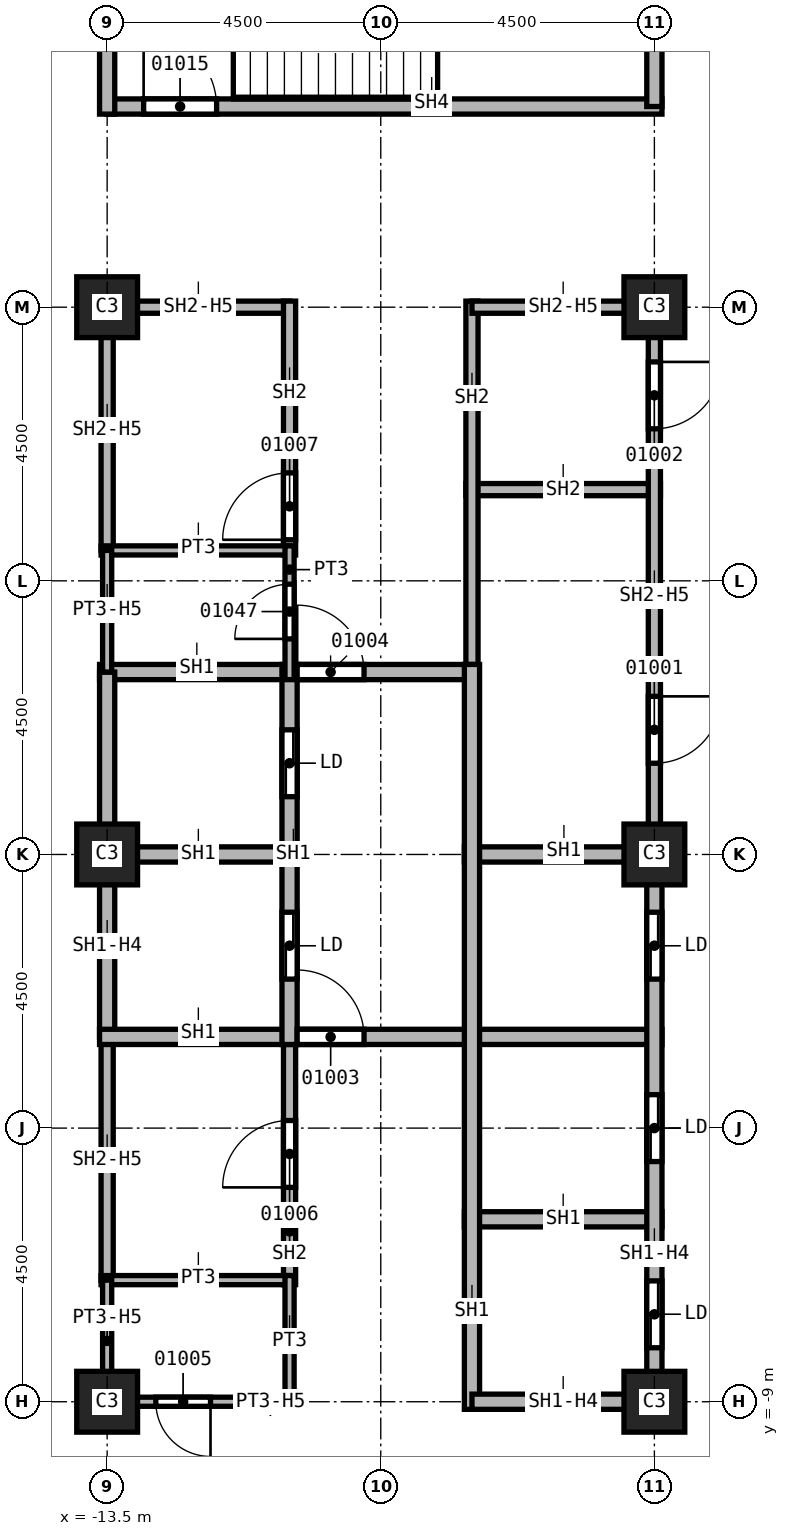
"""IFC4 building model, lengths in metres.
Left out: names, types, materials, properties, quantities, classifications, styles, units other than length and angle.
Written with IfcOpenShell. Run it as: python <this file> out.ifc"""

import sys

from ifc_helpers import new_model, si_unit, direction, frame, frame_2d, origin, origin_2d, place, context, subcontext, project, spatial, rectangle, extrude, element, fill, save


model = new_model("IFC4")
c1 = context("Model", 3, precision=1e-05, world=origin(), true_north=direction((0.0, 1.0)))
c2 = subcontext(c1, "Body", "Model", "MODEL_VIEW")
j1 = project(units=[si_unit("LENGTHUNIT", "METRE"), si_unit("PLANEANGLEUNIT", "RADIAN")], contexts=[c1])
p1 = place(None, origin())
s1 = spatial("IfcSite", under=j1, at=p1, CompositionType="ELEMENT")
p2 = place(p1, origin())
s2 = spatial("IfcBuilding", under=s1, at=p2, CompositionType="ELEMENT")
p3 = place(p2, frame((0.0, 0.0, 68.0)))
s3 = spatial("IfcBuildingStorey", under=s2, at=p3, CompositionType="ELEMENT", Elevation=68.0)
for number, where, z_axis, x_axis in (
    (1, (-4.5, 0.0, 0.0), (0.0, 0.0, 1.0), (1.0, 0.0, 0.0)),
    (2, (-4.5, 9.0, 0.0), (0.0, 0.0, 1.0), (1.0, 0.0, 0.0)),
    (3, (-4.5, -9.0, 0.0), (0.0, 0.0, 1.0), (1.0, 0.0, 0.0)),
    (4, (-13.5, 0.0, 0.0), (0.0, 0.0, 1.0), (1.0, 0.0, 0.0)),
    (5, (-13.5, 9.0, 0.0), (0.0, 0.0, 1.0), (1.0, 0.0, 0.0)),
    (6, (-13.5, -9.0, 0.0), (0.0, 0.0, 1.0), (1.0, 0.0, 0.0)),
):
    element("IfcColumn", number, at=place(p3, frame(where, z_axis=z_axis, x_axis=x_axis)), inside=s3, PredefinedType="COLUMN", context=c2, shape_type="SweptSolid", body=[
        extrude(rectangle(XDim=1.0, YDim=1.0, at=origin_2d()), origin(), (0.0, 0.0, 1.0), 3.7),
    ])
p4 = place(p3, frame((-13.5, -7.0, 0.0), z_axis=(0.0, 0.0, 1.0), x_axis=(0.0, 1.0, 0.0)))
e7 = element("IfcWall", 7, at=p4, inside=s3, PredefinedType="SOLIDWALL", context=c2, shape_type="SweptSolid", body=[
    extrude(rectangle(XDim=4.0, YDim=0.2, at=frame_2d((2.0, 0.0))), origin(), (0.0, 0.0, 1.0), 2.938),
])
p5 = place(p3, frame((-13.5, 5.0, 0.0), z_axis=(0.0, 0.0, 1.0), x_axis=(0.0, 1.0, 0.0)))
e8 = element("IfcWall", 8, at=p5, inside=s3, PredefinedType="SOLIDWALL", context=c2, shape_type="SweptSolid", body=[
    extrude(rectangle(XDim=4.1, YDim=0.2, at=frame_2d((2.05, 0.0))), origin(), (0.0, 0.0, 1.0), 2.938),
])
p6 = place(p3, frame((-13.5, 9.0, 0.0), z_axis=(0.0, 0.0, 1.0), x_axis=(1.0, 0.0, 0.0)))
e9 = element("IfcWall", 9, at=p6, inside=s3, PredefinedType="SOLIDWALL", context=c2, shape_type="SweptSolid", body=[
    extrude(rectangle(XDim=3.0, YDim=0.2, at=frame_2d((1.5, 0.0))), origin(), (0.0, 0.0, 1.0), 2.938),
])
p7 = place(p3, frame((-10.5, -7.075, 0.0), z_axis=(0.0, 0.0, 1.0), x_axis=(0.0, 1.0, 0.0)))
e10 = element("IfcWall", 10, at=p7, inside=s3, PredefinedType="SOLIDWALL", context=c2, shape_type="SweptSolid", body=[
    extrude(rectangle(XDim=4.2, YDim=0.2, at=frame_2d((2.1, 0.0))), origin(), (0.0, 0.0, 1.0), 3.7),
])
p8 = place(p7, frame((1.6, 0.0, 0.0)))
e11 = element("IfcOpeningElement", 11, at=p8, cuts=e10, PredefinedType="OPENING", context=c2, shape_type="SweptSolid", body=[
    extrude(rectangle(XDim=1.1, YDim=2.1, at=frame_2d((0.55, 1.05))), frame((0.0, 0.1, 0.0), z_axis=(0.0, -1.0, 0.0), x_axis=(1.0, 0.0, 0.0)), (0.0, 0.0, 1.0), 0.2),
])
p9 = place(p3, frame((-10.5, 4.925, 0.0), z_axis=(0.0, 0.0, 1.0), x_axis=(0.0, 1.0, 0.0)))
e12 = element("IfcWall", 12, at=p9, inside=s3, PredefinedType="SOLIDWALL", context=c2, shape_type="SweptSolid", body=[
    extrude(rectangle(XDim=4.175, YDim=0.2, at=frame_2d((2.087, 0.0))), origin(), (0.0, 0.0, 1.0), 3.7),
])
p10 = place(p9, frame((0.25, 0.0, 0.0)))
e13 = element("IfcOpeningElement", 13, at=p10, cuts=e12, PredefinedType="OPENING", context=c2, shape_type="SweptSolid", body=[
    extrude(rectangle(XDim=1.1, YDim=2.1, at=frame_2d((0.55, 1.05))), frame((0.0, 0.1, 0.0), z_axis=(0.0, -1.0, 0.0), x_axis=(1.0, 0.0, 0.0)), (0.0, 0.0, 1.0), 0.2),
])
p11 = place(p3, frame((-7.6, 6.0, 0.0), z_axis=(0.0, 0.0, 1.0), x_axis=(1.0, 0.0, 0.0)))
e14 = element("IfcWall", 14, at=p11, inside=s3, PredefinedType="SOLIDWALL", context=c2, shape_type="SweptSolid", body=[
    extrude(rectangle(XDim=3.2, YDim=0.2, at=frame_2d((1.6, 0.0))), origin(), (0.0, 0.0, 1.0), 3.7),
])
p12 = place(p3, frame((-7.5, 2.875, 0.0), z_axis=(0.0, 0.0, 1.0), x_axis=(0.0, 1.0, 0.0)))
e15 = element("IfcWall", 15, at=p12, inside=s3, PredefinedType="SOLIDWALL", context=c2, shape_type="SweptSolid", body=[
    extrude(rectangle(XDim=6.225, YDim=0.2, at=frame_2d((3.113, 0.0))), origin(), (0.0, 0.0, 1.0), 3.7),
])
p13 = place(p3, frame((-7.5, 9.0, 0.0), z_axis=(0.0, 0.0, 1.0), x_axis=(1.0, 0.0, 0.0)))
e16 = element("IfcWall", 16, at=p13, inside=s3, PredefinedType="SOLIDWALL", context=c2, shape_type="SweptSolid", body=[
    extrude(rectangle(XDim=3.0, YDim=0.2, at=frame_2d((1.5, 0.0))), origin(), (0.0, 0.0, 1.0), 2.938),
])
p14 = place(p3, frame((-4.5, 9.1, 0.0), z_axis=(0.0, 0.0, 1.0), x_axis=(0.0, -1.0, 0.0)))
e17 = element("IfcWall", 17, at=p14, inside=s3, PredefinedType="SOLIDWALL", context=c2, shape_type="SweptSolid", body=[
    extrude(rectangle(XDim=9.1, YDim=0.2, at=frame_2d((4.55, 0.0))), origin(), (0.0, 0.0, 1.0), 2.938),
])
p15 = place(p14, frame((6.5, 0.0, 0.0)))
e18 = element("IfcOpeningElement", 18, at=p15, cuts=e17, PredefinedType="OPENING", context=c2, shape_type="SweptSolid", body=[
    extrude(rectangle(XDim=1.1, YDim=2.1, at=frame_2d((0.55, 1.05))), frame((0.0, 0.1, 0.0), z_axis=(0.0, -1.0, 0.0), x_axis=(1.0, 0.0, 0.0)), (0.0, 0.0, 1.0), 0.2),
])
p16 = place(p14, frame((1.0, 0.0, 0.0)))
e19 = element("IfcOpeningElement", 19, at=p16, cuts=e17, PredefinedType="OPENING", context=c2, shape_type="SweptSolid", body=[
    extrude(rectangle(XDim=1.1, YDim=2.1, at=frame_2d((0.55, 1.05))), frame((0.0, 0.1, 0.0), z_axis=(0.0, -1.0, 0.0), x_axis=(1.0, 0.0, 0.0)), (0.0, 0.0, 1.0), 0.2),
])
p17 = place(p3, frame((-13.625, 0.0, 0.0), z_axis=(0.0, 0.0, 1.0), x_axis=(1.0, 0.0, 0.0)))
e20 = element("IfcWall", 20, at=p17, inside=s3, PredefinedType="SOLIDWALL", context=c2, shape_type="SweptSolid", body=[
    extrude(rectangle(XDim=3.125, YDim=0.25, at=frame_2d((1.562, 0.0))), origin(), (0.0, 0.0, 1.0), 3.7),
])
p18 = place(p3, frame((-13.625, 3.0, 0.0), z_axis=(0.0, 0.0, 1.0), x_axis=(1.0, 0.0, 0.0)))
e21 = element("IfcWall", 21, at=p18, inside=s3, PredefinedType="SOLIDWALL", context=c2, shape_type="SweptSolid", body=[
    extrude(rectangle(XDim=6.125, YDim=0.25, at=frame_2d((3.062, 0.0))), origin(), (0.0, 0.0, 1.0), 3.7),
])
p19 = place(p18, frame((3.25, 0.0, 0.0)))
e22 = element("IfcOpeningElement", 22, at=p19, cuts=e21, PredefinedType="OPENING", context=c2, shape_type="SweptSolid", body=[
    extrude(rectangle(XDim=1.1, YDim=2.1, at=frame_2d((0.55, 1.05))), frame((0.0, 0.125, 0.0), z_axis=(0.0, -1.0, 0.0), x_axis=(1.0, 0.0, 0.0)), (0.0, 0.0, 1.0), 0.25),
])
p20 = place(p3, frame((-13.5, -3.0, 0.0), z_axis=(0.0, 0.0, 1.0), x_axis=(0.0, 1.0, 0.0)))
e23 = element("IfcWall", 23, at=p20, inside=s3, PredefinedType="SOLIDWALL", context=c2, shape_type="SweptSolid", body=[
    extrude(rectangle(XDim=6.0, YDim=0.25, at=frame_2d((3.0, 0.0))), origin(), (0.0, 0.0, 1.0), 2.938),
])
p21 = place(p3, frame((-13.625, -3.0, 0.0), z_axis=(0.0, 0.0, 1.0), x_axis=(1.0, 0.0, 0.0)))
e24 = element("IfcWall", 24, at=p21, inside=s3, PredefinedType="SOLIDWALL", context=c2, shape_type="SweptSolid", body=[
    extrude(rectangle(XDim=9.25, YDim=0.25, at=frame_2d((4.625, 0.0))), origin(), (0.0, 0.0, 1.0), 3.7),
])
p22 = place(p21, frame((3.25, 0.0, 0.0)))
e25 = element("IfcOpeningElement", 25, at=p22, cuts=e24, PredefinedType="OPENING", context=c2, shape_type="SweptSolid", body=[
    extrude(rectangle(XDim=1.1, YDim=2.1, at=frame_2d((0.55, 1.05))), frame((0.0, 0.125, 0.0), z_axis=(0.0, -1.0, 0.0), x_axis=(1.0, 0.0, 0.0)), (0.0, 0.0, 1.0), 0.25),
])
p23 = place(p3, frame((-10.5, -3.125, 0.0), z_axis=(0.0, 0.0, 1.0), x_axis=(0.0, 1.0, 0.0)))
e26 = element("IfcWall", 26, at=p23, inside=s3, PredefinedType="SOLIDWALL", context=c2, shape_type="SweptSolid", body=[
    extrude(rectangle(XDim=6.25, YDim=0.25, at=frame_2d((3.125, 0.0))), origin(), (0.0, 0.0, 1.0), 3.7),
])
p24 = place(p23, frame((1.075, 0.0, 0.0)))
e27 = element("IfcOpeningElement", 27, at=p24, cuts=e26, PredefinedType="OPENING", context=c2, shape_type="SweptSolid", body=[
    extrude(rectangle(XDim=1.1, YDim=2.1, at=frame_2d((0.55, 1.05))), frame((0.0, 0.125, 0.0), z_axis=(0.0, -1.0, 0.0), x_axis=(1.0, 0.0, 0.0)), (0.0, 0.0, 1.0), 0.25),
])
p25 = place(p23, frame((4.075, 0.0, 0.0)))
e28 = element("IfcOpeningElement", 28, at=p25, cuts=e26, PredefinedType="OPENING", context=c2, shape_type="SweptSolid", body=[
    extrude(rectangle(XDim=1.1, YDim=2.1, at=frame_2d((0.55, 1.05))), frame((0.0, 0.125, 0.0), z_axis=(0.0, -1.0, 0.0), x_axis=(1.0, 0.0, 0.0)), (0.0, 0.0, 1.0), 0.25),
])
for number, where, z_axis, x_axis in (
    (29, (-7.625, -6.0, 0.0), (0.0, 0.0, 1.0), (1.0, 0.0, 0.0)),
    (30, (-7.625, 0.0, 0.0), (0.0, 0.0, 1.0), (1.0, 0.0, 0.0)),
):
    element("IfcWall", number, at=place(p3, frame(where, z_axis=z_axis, x_axis=x_axis)), inside=s3, PredefinedType="SOLIDWALL", context=c2, shape_type="SweptSolid", body=[
        extrude(rectangle(XDim=3.25, YDim=0.25, at=frame_2d((1.625, 0.0))), origin(), (0.0, 0.0, 1.0), 3.7),
    ])
p26 = place(p3, frame((-7.5, -9.125, 0.0), z_axis=(0.0, 0.0, 1.0), x_axis=(0.0, 1.0, 0.0)))
e31 = element("IfcWall", 31, at=p26, inside=s3, PredefinedType="SOLIDWALL", context=c2, shape_type="SweptSolid", body=[
    extrude(rectangle(XDim=12.25, YDim=0.25, at=frame_2d((6.125, 0.0))), origin(), (0.0, 0.0, 1.0), 3.7),
])
p27 = place(p3, frame((-4.5, -9.0, 0.0), z_axis=(0.0, 0.0, 1.0), x_axis=(-1.0, 0.0, 0.0)))
e32 = element("IfcWall", 32, at=p27, inside=s3, PredefinedType="SOLIDWALL", context=c2, shape_type="SweptSolid", body=[
    extrude(rectangle(XDim=3.0, YDim=0.25, at=frame_2d((1.5, 0.0))), origin(), (0.0, 0.0, 1.0), 2.938),
])
p28 = place(p3, frame((-4.5, 0.0, 0.0), z_axis=(0.0, 0.0, 1.0), x_axis=(0.0, -1.0, 0.0)))
e33 = element("IfcWall", 33, at=p28, inside=s3, PredefinedType="SOLIDWALL", context=c2, shape_type="SweptSolid", body=[
    extrude(rectangle(XDim=9.125, YDim=0.25, at=frame_2d((4.562, 0.0))), origin(), (0.0, 0.0, 1.0), 2.938),
])
p29 = place(p28, frame((7.012, 0.0, 0.0)))
e34 = element("IfcOpeningElement", 34, at=p29, cuts=e33, PredefinedType="OPENING", context=c2, shape_type="SweptSolid", body=[
    extrude(rectangle(XDim=1.1, YDim=2.1, at=frame_2d((0.55, 1.05))), frame((0.0, 0.125, 0.0), z_axis=(0.0, -1.0, 0.0), x_axis=(1.0, 0.0, 0.0)), (0.0, 0.0, 1.0), 0.25),
])
p30 = place(p28, frame((3.95, 0.0, 0.0)))
e35 = element("IfcOpeningElement", 35, at=p30, cuts=e33, PredefinedType="OPENING", context=c2, shape_type="SweptSolid", body=[
    extrude(rectangle(XDim=1.1, YDim=2.1, at=frame_2d((0.55, 1.05))), frame((0.0, 0.125, 0.0), z_axis=(0.0, -1.0, 0.0), x_axis=(1.0, 0.0, 0.0)), (0.0, 0.0, 1.0), 0.25),
])
p31 = place(p28, frame((0.95, 0.0, 0.0)))
e36 = element("IfcOpeningElement", 36, at=p31, cuts=e33, PredefinedType="OPENING", context=c2, shape_type="SweptSolid", body=[
    extrude(rectangle(XDim=1.1, YDim=2.1, at=frame_2d((0.55, 1.05))), frame((0.0, 0.125, 0.0), z_axis=(0.0, -1.0, 0.0), x_axis=(1.0, 0.0, 0.0)), (0.0, 0.0, 1.0), 0.25),
])
p32 = place(p3, frame((-13.5, 12.3, 0.0), z_axis=(0.0, 0.0, 1.0), x_axis=(1.0, 0.0, 0.0)))
e37 = element("IfcWall", 37, at=p32, inside=s3, PredefinedType="SOLIDWALL", context=c2, shape_type="SweptSolid", body=[
    extrude(rectangle(XDim=9.125, YDim=0.25, at=frame_2d((4.562, 0.0))), origin(), (0.0, 0.0, 1.0), 3.7),
])
p33 = place(p32, frame((0.6, 0.0, 0.0)))
e38 = element("IfcOpeningElement", 38, at=p33, cuts=e37, PredefinedType="OPENING", context=c2, shape_type="SweptSolid", body=[
    extrude(rectangle(XDim=1.2, YDim=2.1, at=frame_2d((0.6, 1.05))), frame((0.0, 0.125, 0.0), z_axis=(0.0, -1.0, 0.0), x_axis=(1.0, 0.0, 0.0)), (0.0, 0.0, 1.0), 0.25),
])
p34 = place(p3, frame((-13.5, 12.175, 0.0), z_axis=(0.0, 0.0, 1.0), x_axis=(0.0, 1.0, 0.0)))
e39 = element("IfcWall", 39, at=p34, inside=s3, PredefinedType="SOLIDWALL", context=c2, shape_type="SweptSolid", body=[
    extrude(rectangle(XDim=4.75, YDim=0.25, at=frame_2d((2.375, 0.0))), origin(), (0.0, 0.0, 1.0), 3.7),
])
p35 = place(p3, frame((-4.5, 16.8, 0.0), z_axis=(0.0, 0.0, 1.0), x_axis=(0.0, -1.0, 0.0)))
e40 = element("IfcWall", 40, at=p35, inside=s3, PredefinedType="SOLIDWALL", context=c2, shape_type="SweptSolid", body=[
    extrude(rectangle(XDim=4.5, YDim=0.25, at=frame_2d((2.25, 0.0))), origin(), (0.0, 0.0, 1.0), 3.7),
])
for number, where, z_axis, x_axis in (
    (41, (-13.6, -7.0, 0.0), (0.0, 0.0, 1.0), (1.0, 0.0, 0.0)),
    (42, (-13.6, 5.0, 0.0), (0.0, 0.0, 1.0), (1.0, 0.0, 0.0)),
):
    element("IfcWall", number, at=place(p3, frame(where, z_axis=z_axis, x_axis=x_axis)), inside=s3, PredefinedType="PARTITIONING", context=c2, shape_type="SweptSolid", body=[
        extrude(rectangle(XDim=3.1, YDim=0.15, at=frame_2d((1.55, 0.0))), origin(), (0.0, 0.0, 1.0), 3.7),
    ])
p36 = place(p3, frame((-13.5, -9.075, 0.0), z_axis=(0.0, 0.0, 1.0), x_axis=(0.0, 1.0, 0.0)))
e43 = element("IfcWall", 43, at=p36, inside=s3, PredefinedType="PARTITIONING", context=c2, shape_type="SweptSolid", body=[
    extrude(rectangle(XDim=2.075, YDim=0.15, at=frame_2d((1.038, 0.0))), origin(), (0.0, 0.0, 1.0), 2.938),
])
p37 = place(p3, frame((-13.5, 3.0, 0.0), z_axis=(0.0, 0.0, 1.0), x_axis=(0.0, 1.0, 0.0)))
e44 = element("IfcWall", 44, at=p37, inside=s3, PredefinedType="PARTITIONING", context=c2, shape_type="SweptSolid", body=[
    extrude(rectangle(XDim=2.0, YDim=0.15, at=frame_2d((1.0, 0.0))), origin(), (0.0, 0.0, 1.0), 2.938),
])
p38 = place(p3, frame((-10.5, -9.075, 0.0), z_axis=(0.0, 0.0, 1.0), x_axis=(0.0, 1.0, 0.0)))
e45 = element("IfcWall", 45, at=p38, inside=s3, PredefinedType="PARTITIONING", context=c2, shape_type="SweptSolid", body=[
    extrude(rectangle(XDim=2.15, YDim=0.15, at=frame_2d((1.075, 0.0))), origin(), (0.0, 0.0, 1.0), 3.7),
])
p39 = place(p3, frame((-10.5, -9.0, 0.0), z_axis=(0.0, 0.0, 1.0), x_axis=(-1.0, 0.0, 0.0)))
e46 = element("IfcWall", 46, at=p39, inside=s3, PredefinedType="PARTITIONING", context=c2, shape_type="SweptSolid", body=[
    extrude(rectangle(XDim=3.0, YDim=0.15, at=frame_2d((1.5, 0.0))), origin(), (0.0, 0.0, 1.0), 2.938),
])
p40 = place(p39, frame((1.3, 0.0, 0.0)))
e47 = element("IfcOpeningElement", 47, at=p40, cuts=e46, PredefinedType="OPENING", context=c2, shape_type="SweptSolid", body=[
    extrude(rectangle(XDim=0.9, YDim=2.1, at=frame_2d((0.45, 1.05))), frame((0.0, 0.075, 0.0), z_axis=(0.0, -1.0, 0.0), x_axis=(1.0, 0.0, 0.0)), (0.0, 0.0, 1.0), 0.15),
])
p41 = place(p3, frame((-10.5, 2.875, 0.0), z_axis=(0.0, 0.0, 1.0), x_axis=(0.0, 1.0, 0.0)))
e48 = element("IfcWall", 48, at=p41, inside=s3, PredefinedType="PARTITIONING", context=c2, shape_type="SweptSolid", body=[
    extrude(rectangle(XDim=2.2, YDim=0.15, at=frame_2d((1.1, 0.0))), origin(), (0.0, 0.0, 1.0), 3.7),
])
p42 = place(p41, frame((0.67, 0.0, 0.0)))
e49 = element("IfcOpeningElement", 49, at=p42, cuts=e48, PredefinedType="OPENING", context=c2, shape_type="SweptSolid", body=[
    extrude(rectangle(XDim=0.9, YDim=2.1, at=frame_2d((0.45, 1.05))), frame((0.0, 0.075, 0.0), z_axis=(0.0, -1.0, 0.0), x_axis=(1.0, 0.0, 0.0)), (0.0, 0.0, 1.0), 0.15),
])
p43 = place(p15, origin())
e50 = element("IfcDoor", 50, at=p43, inside=s3, OperationType="SINGLE_SWING_RIGHT", PredefinedType="DOOR", context=c2, shape_type="SweptSolid", body=[
    extrude(rectangle(XDim=1.1, YDim=2.1, at=frame_2d((0.55, 1.05))), frame((0.0, 0.025, 0.0), z_axis=(0.0, -1.0, 0.0), x_axis=(1.0, 0.0, 0.0)), (0.0, 0.0, 1.0), 0.05),
])
fill(e18, e50)
p44 = place(p16, origin())
e51 = element("IfcDoor", 51, at=p44, inside=s3, OperationType="SINGLE_SWING_LEFT", PredefinedType="DOOR", context=c2, shape_type="SweptSolid", body=[
    extrude(rectangle(XDim=1.1, YDim=2.1, at=frame_2d((0.55, 1.05))), frame((0.0, 0.025, 0.0), z_axis=(0.0, -1.0, 0.0), x_axis=(1.0, 0.0, 0.0)), (0.0, 0.0, 1.0), 0.05),
])
fill(e19, e51)
p45 = place(p22, origin())
e52 = element("IfcDoor", 52, at=p45, inside=s3, OperationType="SINGLE_SWING_RIGHT", PredefinedType="DOOR", context=c2, shape_type="SweptSolid", body=[
    extrude(rectangle(XDim=1.1, YDim=2.1, at=frame_2d((0.55, 1.05))), frame((0.0, 0.025, 0.0), z_axis=(0.0, -1.0, 0.0), x_axis=(1.0, 0.0, 0.0)), (0.0, 0.0, 1.0), 0.05),
])
fill(e25, e52)
p46 = place(p19, origin())
e53 = element("IfcDoor", 53, at=p46, inside=s3, OperationType="SINGLE_SWING_LEFT", PredefinedType="DOOR", context=c2, shape_type="SweptSolid", body=[
    extrude(rectangle(XDim=1.1, YDim=2.1, at=frame_2d((0.55, 1.05))), frame((0.0, 0.025, 0.0), z_axis=(0.0, -1.0, 0.0), x_axis=(1.0, 0.0, 0.0)), (0.0, 0.0, 1.0), 0.05),
])
fill(e22, e53)
p47 = place(p40, origin())
e54 = element("IfcDoor", 54, at=p47, inside=s3, OperationType="SINGLE_SWING_RIGHT", PredefinedType="DOOR", context=c2, shape_type="SweptSolid", body=[
    extrude(rectangle(XDim=0.9, YDim=2.1, at=frame_2d((0.45, 1.05))), frame((0.0, 0.025, 0.0), z_axis=(0.0, -1.0, 0.0), x_axis=(1.0, 0.0, 0.0)), (0.0, 0.0, 1.0), 0.05),
])
fill(e47, e54)
p48 = place(p8, origin())
e55 = element("IfcDoor", 55, at=p48, inside=s3, OperationType="SINGLE_SWING_LEFT", PredefinedType="DOOR", context=c2, shape_type="SweptSolid", body=[
    extrude(rectangle(XDim=1.1, YDim=2.1, at=frame_2d((0.55, 1.05))), frame((0.0, 0.025, 0.0), z_axis=(0.0, -1.0, 0.0), x_axis=(1.0, 0.0, 0.0)), (0.0, 0.0, 1.0), 0.05),
])
fill(e11, e55)
p49 = place(p10, origin())
e56 = element("IfcDoor", 56, at=p49, inside=s3, OperationType="SINGLE_SWING_RIGHT", PredefinedType="DOOR", context=c2, shape_type="SweptSolid", body=[
    extrude(rectangle(XDim=1.1, YDim=2.1, at=frame_2d((0.55, 1.05))), frame((0.0, 0.025, 0.0), z_axis=(0.0, -1.0, 0.0), x_axis=(1.0, 0.0, 0.0)), (0.0, 0.0, 1.0), 0.05),
])
fill(e13, e56)
p50 = place(p33, origin())
e57 = element("IfcDoor", 57, at=p50, inside=s3, OperationType="SINGLE_SWING_RIGHT", PredefinedType="DOOR", context=c2, shape_type="SweptSolid", body=[
    extrude(rectangle(XDim=1.2, YDim=2.1, at=frame_2d((0.6, 1.05))), frame((0.0, 0.025, 0.0), z_axis=(0.0, -1.0, 0.0), x_axis=(1.0, 0.0, 0.0)), (0.0, 0.0, 1.0), 0.05),
])
fill(e38, e57)
p51 = place(p42, origin())
e58 = element("IfcDoor", 58, at=p51, inside=s3, OperationType="SINGLE_SWING_LEFT", PredefinedType="DOOR", context=c2, shape_type="SweptSolid", body=[
    extrude(rectangle(XDim=0.9, YDim=2.1, at=frame_2d((0.45, 1.05))), frame((0.0, 0.025, 0.0), z_axis=(0.0, -1.0, 0.0), x_axis=(1.0, 0.0, 0.0)), (0.0, 0.0, 1.0), 0.05),
])
fill(e49, e58)
p52 = place(p29, origin())
e59 = element("IfcDoor", 59, at=p52, inside=s3, OperationType="SLIDING_TO_LEFT", PredefinedType="DOOR", context=c2, shape_type="SweptSolid", body=[
    extrude(rectangle(XDim=1.1, YDim=2.1, at=frame_2d((0.55, 1.05))), frame((0.0, 0.025, 0.0), z_axis=(0.0, -1.0, 0.0), x_axis=(1.0, 0.0, 0.0)), (0.0, 0.0, 1.0), 0.05),
])
fill(e34, e59)
p53 = place(p30, origin())
e60 = element("IfcDoor", 60, at=p53, inside=s3, OperationType="SLIDING_TO_LEFT", PredefinedType="DOOR", context=c2, shape_type="SweptSolid", body=[
    extrude(rectangle(XDim=1.1, YDim=2.1, at=frame_2d((0.55, 1.05))), frame((0.0, 0.025, 0.0), z_axis=(0.0, -1.0, 0.0), x_axis=(1.0, 0.0, 0.0)), (0.0, 0.0, 1.0), 0.05),
])
fill(e35, e60)
p54 = place(p31, origin())
e61 = element("IfcDoor", 61, at=p54, inside=s3, OperationType="SLIDING_TO_LEFT", PredefinedType="DOOR", context=c2, shape_type="SweptSolid", body=[
    extrude(rectangle(XDim=1.1, YDim=2.1, at=frame_2d((0.55, 1.05))), frame((0.0, 0.025, 0.0), z_axis=(0.0, -1.0, 0.0), x_axis=(1.0, 0.0, 0.0)), (0.0, 0.0, 1.0), 0.05),
])
fill(e36, e61)
p55 = place(p24, origin())
e62 = element("IfcDoor", 62, at=p55, inside=s3, OperationType="SLIDING_TO_LEFT", PredefinedType="DOOR", context=c2, shape_type="SweptSolid", body=[
    extrude(rectangle(XDim=1.1, YDim=2.1, at=frame_2d((0.55, 1.05))), frame((0.0, 0.025, 0.0), z_axis=(0.0, -1.0, 0.0), x_axis=(1.0, 0.0, 0.0)), (0.0, 0.0, 1.0), 0.05),
])
fill(e27, e62)
p56 = place(p25, origin())
e63 = element("IfcDoor", 63, at=p56, inside=s3, OperationType="SLIDING_TO_LEFT", PredefinedType="DOOR", context=c2, shape_type="SweptSolid", body=[
    extrude(rectangle(XDim=1.1, YDim=2.1, at=frame_2d((0.55, 1.05))), frame((0.0, 0.025, 0.0), z_axis=(0.0, -1.0, 0.0), x_axis=(1.0, 0.0, 0.0)), (0.0, 0.0, 1.0), 0.05),
])
fill(e28, e63)
save(model, sys.argv[1])
